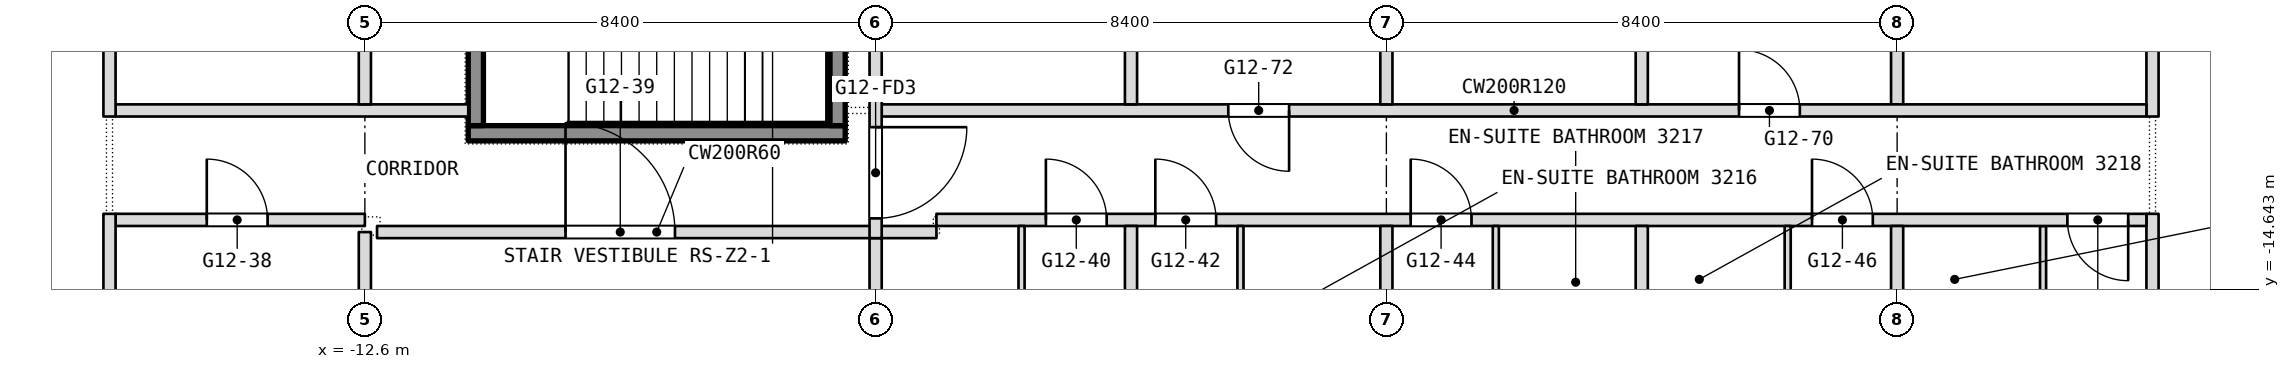
"""IFC4 building model, lengths in metres.
Left out: names, types, materials, properties, quantities, classifications, styles, units other than length and angle.
Written with IfcOpenShell. Run it as: python <this file> out.ifc"""

import sys

from ifc_helpers import new_model, si_unit, direction, frame, frame_2d, origin, place, context, subcontext, project, spatial, rectangle, extrude, element, fill, save


model = new_model("IFC4")
c1 = context("Model", 3, precision=1e-05, world=origin(), true_north=direction((0.0, 1.0)))
c2 = subcontext(c1, "Body", "Model", "MODEL_VIEW")
j1 = project(units=[si_unit("LENGTHUNIT", "METRE"), si_unit("PLANEANGLEUNIT", "RADIAN")], contexts=[c1])
p1 = place(None, origin())
s1 = spatial("IfcSite", under=j1, at=p1, CompositionType="ELEMENT")
p2 = place(p1, origin())
s2 = spatial("IfcBuilding", under=s1, at=p2, CompositionType="ELEMENT")
p3 = place(p2, frame((0.0, 0.0, 140.9)))
s3 = spatial("IfcBuildingStorey", under=s2, at=p3, CompositionType="ELEMENT", Elevation=140.9)
p4 = place(p3, frame((16.8, -22.186, 0.0), z_axis=(0.0, 0.0, 1.0), x_axis=(0.0, 1.0, 0.0)))
e1 = element("IfcWall", 1, at=p4, inside=s3, PredefinedType="PARTITIONING", context=c2, shape_type="SweptSolid", body=[
    extrude(rectangle(XDim=8.786, YDim=0.2, at=frame_2d((4.393, 0.0))), origin(), (0.0, 0.0, 1.0), 3.34),
])
p5 = place(p3, frame((16.8, -11.8, 0.0), z_axis=(0.0, 0.0, 1.0), x_axis=(0.0, 1.0, 0.0)))
e2 = element("IfcWall", 2, at=p5, inside=s3, PredefinedType="PARTITIONING", context=c2, shape_type="SweptSolid", body=[
    extrude(rectangle(XDim=9.9, YDim=0.2, at=frame_2d((4.95, 0.0))), origin(), (0.0, 0.0, 1.0), 3.34),
])
p6 = place(p3, frame((15.0, -16.25, 0.0), z_axis=(0.0, 0.0, 1.0), x_axis=(0.0, 1.0, 0.0)))
e3 = element("IfcWall", 3, at=p6, inside=s3, PredefinedType="PARTITIONING", context=c2, shape_type="SweptSolid", body=[
    extrude(rectangle(XDim=2.65, YDim=0.1, at=frame_2d((1.325, 0.0))), origin(), (0.0, 0.0, 1.0), 3.34),
])
p7 = place(p3, frame((-12.4, -13.7, 0.0), z_axis=(0.0, 0.0, 1.0), x_axis=(1.0, 0.0, 0.0)))
e4 = element("IfcWall", 4, at=p7, inside=s3, PredefinedType="PARTITIONING", context=c2, shape_type="SweptSolid", body=[
    extrude(rectangle(XDim=9.2, YDim=0.2, at=frame_2d((4.6, 0.0))), origin(), (0.0, 0.0, 1.0), 3.34),
])
p8 = place(p7, frame((3.1, 0.0, 0.0)))
e5 = element("IfcOpeningElement", 5, at=p8, cuts=e4, PredefinedType="OPENING", context=c2, shape_type="SweptSolid", body=[
    extrude(rectangle(XDim=1.8, YDim=2.1, at=frame_2d((0.9, 1.05))), frame((0.0, 0.1, 0.0), z_axis=(0.0, -1.0, 0.0), x_axis=(1.0, 0.0, 0.0)), (0.0, 0.0, 1.0), 0.2),
])
p9 = place(p3, frame((-16.7, -13.5, 0.0), z_axis=(0.0, 0.0, 1.0), x_axis=(1.0, 0.0, 0.0)))
e6 = element("IfcWall", 6, at=p9, inside=s3, PredefinedType="PARTITIONING", context=c2, shape_type="SweptSolid", body=[
    extrude(rectangle(XDim=4.1, YDim=0.2, at=frame_2d((2.05, 0.0))), origin(), (0.0, 0.0, 1.0), 3.34),
])
p10 = place(p9, frame((1.5, 0.0, 0.0)))
e7 = element("IfcOpeningElement", 7, at=p10, cuts=e6, PredefinedType="OPENING", context=c2, shape_type="SweptSolid", body=[
    extrude(rectangle(XDim=1.0, YDim=2.1, at=frame_2d((0.5, 1.05))), frame((0.0, 0.1, 0.0), z_axis=(0.0, -1.0, 0.0), x_axis=(1.0, 0.0, 0.0)), (0.0, 0.0, 1.0), 0.2),
])
p11 = place(p3, frame((-3.2, -13.5, 0.0), z_axis=(0.0, 0.0, 1.0), x_axis=(1.0, 0.0, 0.0)))
e8 = element("IfcWall", 8, at=p11, inside=s3, PredefinedType="PARTITIONING", context=c2, shape_type="SweptSolid", body=[
    extrude(rectangle(XDim=19.9, YDim=0.2, at=frame_2d((9.95, 0.0))), origin(), (0.0, 0.0, 1.0), 3.34),
])
p12 = place(p11, frame((1.8, 0.0, 0.0)))
e9 = element("IfcOpeningElement", 9, at=p12, cuts=e8, PredefinedType="OPENING", context=c2, shape_type="SweptSolid", body=[
    extrude(rectangle(XDim=1.0, YDim=2.1, at=frame_2d((0.5, 1.05))), frame((0.0, 0.1, 0.0), z_axis=(0.0, -1.0, 0.0), x_axis=(1.0, 0.0, 0.0)), (0.0, 0.0, 1.0), 0.2),
])
p13 = place(p11, frame((3.6, 0.0, 0.0)))
e10 = element("IfcOpeningElement", 10, at=p13, cuts=e8, PredefinedType="OPENING", context=c2, shape_type="SweptSolid", body=[
    extrude(rectangle(XDim=1.0, YDim=2.1, at=frame_2d((0.5, 1.05))), frame((0.0, 0.1, 0.0), z_axis=(0.0, -1.0, 0.0), x_axis=(1.0, 0.0, 0.0)), (0.0, 0.0, 1.0), 0.2),
])
p14 = place(p11, frame((7.8, 0.0, 0.0)))
e11 = element("IfcOpeningElement", 11, at=p14, cuts=e8, PredefinedType="OPENING", context=c2, shape_type="SweptSolid", body=[
    extrude(rectangle(XDim=1.0, YDim=2.1, at=frame_2d((0.5, 1.05))), frame((0.0, 0.1, 0.0), z_axis=(0.0, -1.0, 0.0), x_axis=(1.0, 0.0, 0.0)), (0.0, 0.0, 1.0), 0.2),
])
p15 = place(p11, frame((14.4, 0.0, 0.0)))
e12 = element("IfcOpeningElement", 12, at=p15, cuts=e8, PredefinedType="OPENING", context=c2, shape_type="SweptSolid", body=[
    extrude(rectangle(XDim=1.0, YDim=2.1, at=frame_2d((0.5, 1.05))), frame((0.0, 0.1, 0.0), z_axis=(0.0, -1.0, 0.0), x_axis=(1.0, 0.0, 0.0)), (0.0, 0.0, 1.0), 0.2),
])
p16 = place(p11, frame((18.6, 0.0, 0.0)))
e13 = element("IfcOpeningElement", 13, at=p16, cuts=e8, PredefinedType="OPENING", context=c2, shape_type="SweptSolid", body=[
    extrude(rectangle(XDim=1.0, YDim=2.1, at=frame_2d((0.5, 1.05))), frame((0.0, 0.1, 0.0), z_axis=(0.0, -1.0, 0.0), x_axis=(1.0, 0.0, 0.0)), (0.0, 0.0, 1.0), 0.2),
])
p17 = place(p3, frame((12.6, -21.175, 0.0), z_axis=(0.0, 0.0, 1.0), x_axis=(0.0, 1.0, 0.0)))
e14 = element("IfcWall", 14, at=p17, inside=s3, PredefinedType="PARTITIONING", context=c2, shape_type="SweptSolid", body=[
    extrude(rectangle(XDim=7.575, YDim=0.2, at=frame_2d((3.788, 0.0))), origin(), (0.0, 0.0, 1.0), 3.34),
])
p18 = place(p3, frame((12.6, -11.6, 0.0), z_axis=(0.0, 0.0, 1.0), x_axis=(0.0, 1.0, 0.0)))
e15 = element("IfcWall", 15, at=p18, inside=s3, PredefinedType="PARTITIONING", context=c2, shape_type="SweptSolid", body=[
    extrude(rectangle(XDim=3.9, YDim=0.2, at=frame_2d((1.95, 0.0))), origin(), (0.0, 0.0, 1.0), 3.34),
])
p19 = place(p3, frame((-16.7, -11.7, 0.0), z_axis=(0.0, 0.0, 1.0), x_axis=(1.0, 0.0, 0.0)))
e16 = element("IfcWall", 16, at=p19, inside=s3, PredefinedType="PARTITIONING", context=c2, shape_type="SweptSolid", body=[
    extrude(rectangle(XDim=5.8, YDim=0.2, at=frame_2d((2.9, 0.0))), origin(), (0.0, 0.0, 1.0), 3.34),
])
p20 = place(p3, frame((-4.1, -11.7, 0.0), z_axis=(0.0, 0.0, 1.0), x_axis=(1.0, 0.0, 0.0)))
e17 = element("IfcWall", 17, at=p20, inside=s3, PredefinedType="PARTITIONING", context=c2, shape_type="SweptSolid", body=[
    extrude(rectangle(XDim=20.8, YDim=0.2, at=frame_2d((10.4, 0.0))), origin(), (0.0, 0.0, 1.0), 3.34),
])
p21 = place(p20, frame((14.1, 0.0, 0.0)))
e18 = element("IfcOpeningElement", 18, at=p21, cuts=e17, PredefinedType="OPENING", context=c2, shape_type="SweptSolid", body=[
    extrude(rectangle(XDim=1.0, YDim=2.1, at=frame_2d((0.5, 1.05))), frame((0.0, 0.1, 0.0), z_axis=(0.0, -1.0, 0.0), x_axis=(1.0, 0.0, 0.0)), (0.0, 0.0, 1.0), 0.2),
])
p22 = place(p20, frame((5.7, 0.0, 0.0)))
e19 = element("IfcOpeningElement", 19, at=p22, cuts=e17, PredefinedType="OPENING", context=c2, shape_type="SweptSolid", body=[
    extrude(rectangle(XDim=1.0, YDim=2.1, at=frame_2d((0.5, 1.05))), frame((0.0, 0.1, 0.0), z_axis=(0.0, -1.0, 0.0), x_axis=(1.0, 0.0, 0.0)), (0.0, 0.0, 1.0), 0.2),
])
p23 = place(p3, frame((10.8, -16.25, 0.0), z_axis=(0.0, 0.0, 1.0), x_axis=(0.0, 1.0, 0.0)))
e20 = element("IfcWall", 20, at=p23, inside=s3, PredefinedType="PARTITIONING", context=c2, shape_type="SweptSolid", body=[
    extrude(rectangle(XDim=2.65, YDim=0.1, at=frame_2d((1.325, 0.0))), origin(), (0.0, 0.0, 1.0), 3.34),
])
p24 = place(p3, frame((8.4, -23.3, 0.0), z_axis=(0.0, 0.0, 1.0), x_axis=(0.0, 1.0, 0.0)))
e21 = element("IfcWall", 21, at=p24, inside=s3, PredefinedType="PARTITIONING", context=c2, shape_type="SweptSolid", body=[
    extrude(rectangle(XDim=9.7, YDim=0.2, at=frame_2d((4.85, 0.0))), origin(), (0.0, 0.0, 1.0), 3.34),
])
p25 = place(p3, frame((8.4, -11.6, 0.0), z_axis=(0.0, 0.0, 1.0), x_axis=(0.0, 1.0, 0.0)))
e22 = element("IfcWall", 22, at=p25, inside=s3, PredefinedType="PARTITIONING", context=c2, shape_type="SweptSolid", body=[
    extrude(rectangle(XDim=3.8, YDim=0.2, at=frame_2d((1.9, 0.0))), origin(), (0.0, 0.0, 1.0), 3.34),
])
p26 = place(p3, frame((6.0, -16.55, 0.0), z_axis=(0.0, 0.0, 1.0), x_axis=(0.0, 1.0, 0.0)))
e23 = element("IfcWall", 23, at=p26, inside=s3, PredefinedType="PARTITIONING", context=c2, shape_type="SweptSolid", body=[
    extrude(rectangle(XDim=2.95, YDim=0.1, at=frame_2d((1.475, 0.0))), origin(), (0.0, 0.0, 1.0), 3.34),
])
p27 = place(p3, frame((4.2, -23.3, 0.0), z_axis=(0.0, 0.0, 1.0), x_axis=(0.0, 1.0, 0.0)))
e24 = element("IfcWall", 24, at=p27, inside=s3, PredefinedType="PARTITIONING", context=c2, shape_type="SweptSolid", body=[
    extrude(rectangle(XDim=9.7, YDim=0.2, at=frame_2d((4.85, 0.0))), origin(), (0.0, 0.0, 1.0), 3.34),
])
p28 = place(p3, frame((4.2, -11.6, 0.0), z_axis=(0.0, 0.0, 1.0), x_axis=(0.0, 1.0, 0.0)))
e25 = element("IfcWall", 25, at=p28, inside=s3, PredefinedType="PARTITIONING", context=c2, shape_type="SweptSolid", body=[
    extrude(rectangle(XDim=9.7, YDim=0.2, at=frame_2d((4.85, 0.0))), origin(), (0.0, 0.0, 1.0), 3.34),
])
p29 = place(p3, frame((1.8, -16.95, 0.0), z_axis=(0.0, 0.0, 1.0), x_axis=(0.0, 1.0, 0.0)))
e26 = element("IfcWall", 26, at=p29, inside=s3, PredefinedType="PARTITIONING", context=c2, shape_type="SweptSolid", body=[
    extrude(rectangle(XDim=3.35, YDim=0.1, at=frame_2d((1.675, 0.0))), origin(), (0.0, 0.0, 1.0), 3.34),
])
p30 = place(p3, frame((0.0, -23.3, 0.0), z_axis=(0.0, 0.0, 1.0), x_axis=(0.0, 1.0, 0.0)))
e27 = element("IfcWall", 27, at=p30, inside=s3, PredefinedType="PARTITIONING", context=c2, shape_type="SweptSolid", body=[
    extrude(rectangle(XDim=9.7, YDim=0.2, at=frame_2d((4.85, 0.0))), origin(), (0.0, 0.0, 1.0), 3.34),
])
p31 = place(p3, frame((0.0, -11.6, 0.0), z_axis=(0.0, 0.0, 1.0), x_axis=(0.0, 1.0, 0.0)))
e28 = element("IfcWall", 28, at=p31, inside=s3, PredefinedType="PARTITIONING", context=c2, shape_type="SweptSolid", body=[
    extrude(rectangle(XDim=9.7, YDim=0.2, at=frame_2d((4.85, 0.0))), origin(), (0.0, 0.0, 1.0), 3.34),
])
p32 = place(p3, frame((-1.8, -17.65, 0.0), z_axis=(0.0, 0.0, 1.0), x_axis=(0.0, 1.0, 0.0)))
e29 = element("IfcWall", 29, at=p32, inside=s3, PredefinedType="PARTITIONING", context=c2, shape_type="SweptSolid", body=[
    extrude(rectangle(XDim=4.05, YDim=0.1, at=frame_2d((2.025, 0.0))), origin(), (0.0, 0.0, 1.0), 3.34),
])
p33 = place(p3, frame((-4.2, -23.3, 0.0), z_axis=(0.0, 0.0, 1.0), x_axis=(0.0, 1.0, 0.0)))
e30 = element("IfcWall", 30, at=p33, inside=s3, PredefinedType="PARTITIONING", context=c2, shape_type="SweptSolid", body=[
    extrude(rectangle(XDim=9.5, YDim=0.2, at=frame_2d((4.75, 0.0))), origin(), (0.0, 0.0, 1.0), 3.34),
])
p34 = place(p3, frame((-4.2, -13.8, 0.0), z_axis=(0.0, 0.0, 1.0), x_axis=(0.0, 1.0, 0.0)))
e31 = element("IfcWall", 31, at=p34, inside=s3, PredefinedType="PARTITIONING", context=c2, shape_type="SweptSolid", body=[
    extrude(rectangle(XDim=13.8, YDim=0.2, at=frame_2d((6.9, 0.0))), origin(), (0.0, 0.0, 1.0), 3.34),
])
p35 = place(p34, frame((12.15, 0.0, 0.0)))
e32 = element("IfcOpeningElement", 32, at=p35, cuts=e31, PredefinedType="OPENING", context=c2, shape_type="SweptSolid", body=[
    extrude(rectangle(XDim=1.5, YDim=2.1, at=frame_2d((0.75, 1.05))), frame((0.0, 0.1, 0.0), z_axis=(0.0, -1.0, 0.0), x_axis=(1.0, 0.0, 0.0)), (0.0, 0.0, 1.0), 0.2),
])
p36 = place(p34, frame((0.325, 0.0, 0.0)))
e33 = element("IfcOpeningElement", 33, at=p36, cuts=e31, PredefinedType="OPENING", context=c2, shape_type="SweptSolid", body=[
    extrude(rectangle(XDim=1.5, YDim=2.1, at=frame_2d((0.75, 1.05))), frame((0.0, 0.1, 0.0), z_axis=(0.0, -1.0, 0.0), x_axis=(1.0, 0.0, 0.0)), (0.0, 0.0, 1.0), 0.2),
])
p37 = place(p3, frame((-12.6, -21.175, 0.0), z_axis=(0.0, 0.0, 1.0), x_axis=(0.0, 1.0, 0.0)))
e34 = element("IfcWall", 34, at=p37, inside=s3, PredefinedType="PARTITIONING", context=c2, shape_type="SweptSolid", body=[
    extrude(rectangle(XDim=7.475, YDim=0.2, at=frame_2d((3.738, 0.0))), origin(), (0.0, 0.0, 1.0), 3.34),
])
p38 = place(p3, frame((-12.6, -11.6, 0.0), z_axis=(0.0, 0.0, 1.0), x_axis=(0.0, 1.0, 0.0)))
e35 = element("IfcWall", 35, at=p38, inside=s3, PredefinedType="PARTITIONING", context=c2, shape_type="SweptSolid", body=[
    extrude(rectangle(XDim=9.7, YDim=0.2, at=frame_2d((4.85, 0.0))), origin(), (0.0, 0.0, 1.0), 3.34),
])
p39 = place(p3, frame((-16.8, -22.186, 0.0), z_axis=(0.0, 0.0, 1.0), x_axis=(0.0, 1.0, 0.0)))
e36 = element("IfcWall", 36, at=p39, inside=s3, PredefinedType="PARTITIONING", context=c2, shape_type="SweptSolid", body=[
    extrude(rectangle(XDim=8.786, YDim=0.2, at=frame_2d((4.393, 0.0))), origin(), (0.0, 0.0, 1.0), 3.34),
])
p40 = place(p3, frame((-16.8, -11.8, 0.0), z_axis=(0.0, 0.0, 1.0), x_axis=(0.0, 1.0, 0.0)))
e37 = element("IfcWall", 37, at=p40, inside=s3, PredefinedType="PARTITIONING", context=c2, shape_type="SweptSolid", body=[
    extrude(rectangle(XDim=9.9, YDim=0.2, at=frame_2d((4.95, 0.0))), origin(), (0.0, 0.0, 1.0), 3.34),
])
p41 = place(p3, frame((-10.9, -12.075, 0.1), z_axis=(0.0, 0.0, 1.0), x_axis=(1.0, 0.0, 0.0)))
e38 = element("IfcWall", 38, at=p41, inside=s3, PredefinedType="SHEAR", context=c2, shape_type="SweptSolid", body=[
    extrude(rectangle(XDim=6.2, YDim=0.25, at=frame_2d((3.1, 0.0))), origin(), (0.0, 0.0, 1.0), 3.6),
])
for number, where, z_axis, x_axis in (
    (39, (-10.775, -11.95, 0.1), (0.0, 0.0, 1.0), (0.0, 1.0, 0.0)),
    (40, (-4.825, -11.95, 0.1), (0.0, 0.0, 1.0), (0.0, 1.0, 0.0)),
):
    element("IfcWall", number, at=place(p3, frame(where, z_axis=z_axis, x_axis=x_axis)), inside=s3, PredefinedType="SHEAR", context=c2, shape_type="SweptSolid", body=[
        extrude(rectangle(XDim=2.9, YDim=0.25, at=frame_2d((1.45, 0.0))), origin(), (0.0, 0.0, 1.0), 3.6),
    ])
p42 = place(p8, origin())
e41 = element("IfcDoor", 41, at=p42, inside=s3, OperationType="DOUBLE_DOOR_SINGLE_SWING", PredefinedType="DOOR", context=c2, shape_type="SweptSolid", body=[
    extrude(rectangle(XDim=1.8, YDim=2.1, at=frame_2d((0.9, 1.05))), frame((0.0, 0.025, 0.0), z_axis=(0.0, -1.0, 0.0), x_axis=(1.0, 0.0, 0.0)), (0.0, 0.0, 1.0), 0.05),
])
fill(e5, e41)
p43 = place(p10, origin())
e42 = element("IfcDoor", 42, at=p43, inside=s3, OperationType="SINGLE_SWING_LEFT", PredefinedType="DOOR", context=c2, shape_type="SweptSolid", body=[
    extrude(rectangle(XDim=1.0, YDim=2.1, at=frame_2d((0.5, 1.05))), frame((0.0, 0.025, 0.0), z_axis=(0.0, -1.0, 0.0), x_axis=(1.0, 0.0, 0.0)), (0.0, 0.0, 1.0), 0.05),
])
fill(e7, e42)
p44 = place(p12, origin())
e43 = element("IfcDoor", 43, at=p44, inside=s3, OperationType="SINGLE_SWING_RIGHT", PredefinedType="DOOR", context=c2, shape_type="SweptSolid", body=[
    extrude(rectangle(XDim=1.0, YDim=2.1, at=frame_2d((0.5, 1.05))), frame((0.0, 0.025, 0.0), z_axis=(0.0, -1.0, 0.0), x_axis=(1.0, 0.0, 0.0)), (0.0, 0.0, 1.0), 0.05),
])
fill(e9, e43)
p45 = place(p13, origin())
e44 = element("IfcDoor", 44, at=p45, inside=s3, OperationType="SINGLE_SWING_RIGHT", PredefinedType="DOOR", context=c2, shape_type="SweptSolid", body=[
    extrude(rectangle(XDim=1.0, YDim=2.1, at=frame_2d((0.5, 1.05))), frame((0.0, 0.025, 0.0), z_axis=(0.0, -1.0, 0.0), x_axis=(1.0, 0.0, 0.0)), (0.0, 0.0, 1.0), 0.05),
])
fill(e10, e44)
p46 = place(p14, origin())
e45 = element("IfcDoor", 45, at=p46, inside=s3, OperationType="SINGLE_SWING_RIGHT", PredefinedType="DOOR", context=c2, shape_type="SweptSolid", body=[
    extrude(rectangle(XDim=1.0, YDim=2.1, at=frame_2d((0.5, 1.05))), frame((0.0, 0.025, 0.0), z_axis=(0.0, -1.0, 0.0), x_axis=(1.0, 0.0, 0.0)), (0.0, 0.0, 1.0), 0.05),
])
fill(e11, e45)
p47 = place(p15, origin())
e46 = element("IfcDoor", 46, at=p47, inside=s3, OperationType="SINGLE_SWING_RIGHT", PredefinedType="DOOR", context=c2, shape_type="SweptSolid", body=[
    extrude(rectangle(XDim=1.0, YDim=2.1, at=frame_2d((0.5, 1.05))), frame((0.0, 0.025, 0.0), z_axis=(0.0, -1.0, 0.0), x_axis=(1.0, 0.0, 0.0)), (0.0, 0.0, 1.0), 0.05),
])
fill(e12, e46)
p48 = place(p16, origin())
e47 = element("IfcDoor", 47, at=p48, inside=s3, OperationType="SINGLE_SWING_LEFT", PredefinedType="DOOR", context=c2, shape_type="SweptSolid", body=[
    extrude(rectangle(XDim=1.0, YDim=2.1, at=frame_2d((0.5, 1.05))), frame((0.0, 0.025, 0.0), z_axis=(0.0, -1.0, 0.0), x_axis=(1.0, 0.0, 0.0)), (0.0, 0.0, 1.0), 0.05),
])
fill(e13, e47)
p49 = place(p21, origin())
e48 = element("IfcDoor", 48, at=p49, inside=s3, OperationType="SINGLE_SWING_RIGHT", PredefinedType="DOOR", context=c2, shape_type="SweptSolid", body=[
    extrude(rectangle(XDim=1.0, YDim=2.1, at=frame_2d((0.5, 1.05))), frame((0.0, 0.025, 0.0), z_axis=(0.0, -1.0, 0.0), x_axis=(1.0, 0.0, 0.0)), (0.0, 0.0, 1.0), 0.05),
])
fill(e18, e48)
p50 = place(p22, origin())
e49 = element("IfcDoor", 49, at=p50, inside=s3, OperationType="SINGLE_SWING_RIGHT", PredefinedType="DOOR", context=c2, shape_type="SweptSolid", body=[
    extrude(rectangle(XDim=1.0, YDim=2.1, at=frame_2d((0.5, 1.05))), frame((0.0, 0.025, 0.0), z_axis=(0.0, -1.0, 0.0), x_axis=(1.0, 0.0, 0.0)), (0.0, 0.0, 1.0), 0.05),
])
fill(e19, e49)
p51 = place(p36, origin())
e50 = element("IfcDoor", 50, at=p51, inside=s3, OperationType="DOUBLE_DOOR_DOUBLE_SWING", PredefinedType="DOOR", context=c2, shape_type="SweptSolid", body=[
    extrude(rectangle(XDim=1.5, YDim=2.1, at=frame_2d((0.75, 1.05))), frame((0.0, 0.025, 0.0), z_axis=(0.0, -1.0, 0.0), x_axis=(1.0, 0.0, 0.0)), (0.0, 0.0, 1.0), 0.05),
])
fill(e33, e50)
save(model, sys.argv[1])
